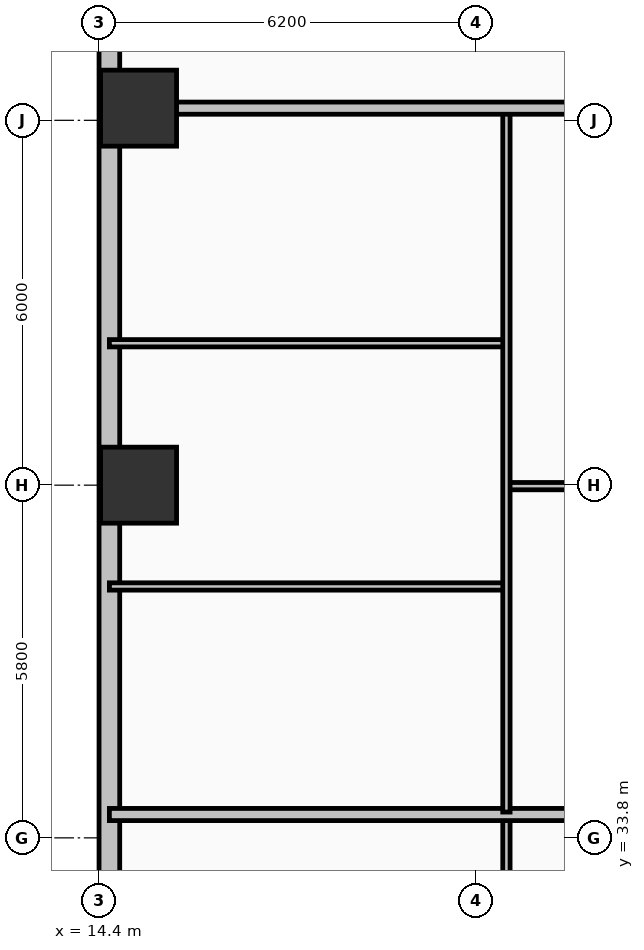
"""IFC4 building model, lengths in metres.
Left out: names, types, materials, properties, quantities, classifications, styles, units other than length and angle.
Written with IfcOpenShell. Run it as: python <this file> out.ifc"""

import sys

from ifc_helpers import new_model, si_unit, direction, frame, frame_2d, origin, origin_2d, place, context, subcontext, project, spatial, rectangle, extrude, element, fill, save


model = new_model("IFC4")
c1 = context("Model", 3, precision=1e-05, world=origin(), true_north=direction((0.0, 1.0)))
c2 = subcontext(c1, "Body", "Model", "MODEL_VIEW")
j1 = project(units=[si_unit("LENGTHUNIT", "METRE"), si_unit("PLANEANGLEUNIT", "RADIAN")], contexts=[c1])
p1 = place(None, origin())
s1 = spatial("IfcSite", under=j1, at=p1, CompositionType="ELEMENT")
p2 = place(p1, origin())
s2 = spatial("IfcBuilding", under=s1, at=p2, CompositionType="ELEMENT")
p3 = place(p2, frame((0.0, 0.0, 36.2)))
s3 = spatial("IfcBuildingStorey", under=s2, at=p3, CompositionType="ELEMENT", Elevation=36.2)
for number, where, z_axis, x_axis in (
    (1, (15.05, 39.6, 0.0), (0.0, 0.0, 1.0), (1.0, 0.0, 0.0)),
    (2, (15.05, 45.8, 0.0), (0.0, 0.0, 1.0), (1.0, 0.0, 0.0)),
):
    element("IfcColumn", number, at=place(p3, frame(where, z_axis=z_axis, x_axis=x_axis)), inside=s3, PredefinedType="COLUMN", context=c2, shape_type="SweptSolid", body=[
        extrude(rectangle(XDim=1.25, YDim=1.25, at=origin_2d()), origin(), (0.0, 0.0, 1.0), 3.7),
    ])
p4 = place(p3, frame((14.57, 47.4, 0.0), z_axis=(0.0, 0.0, 1.0), x_axis=(0.0, -1.0, 0.0)))
e3 = element("IfcWall", 3, at=p4, inside=s3, PredefinedType="SOLIDWALL", context=c2, shape_type="SweptSolid", body=[
    extrude(rectangle(XDim=14.8, YDim=0.34, at=frame_2d((7.4, 0.0))), origin(), (0.0, 0.0, 1.0), 2.7),
])
p5 = place(p4, frame((2.84, 0.0, 0.69)))
e4 = element("IfcOpeningElement", 4, at=p5, cuts=e3, PredefinedType="OPENING", context=c2, shape_type="SweptSolid", body=[
    extrude(rectangle(XDim=1.4, YDim=1.85, at=frame_2d((0.7, 0.925))), frame((0.0, 0.18, 0.0), z_axis=(0.0, -1.0, 0.0), x_axis=(1.0, 0.0, 0.0)), (0.0, 0.0, 1.0), 0.36),
])
p6 = place(p4, frame((5.72, 0.0, 0.69)))
e5 = element("IfcOpeningElement", 5, at=p6, cuts=e3, PredefinedType="OPENING", context=c2, shape_type="SweptSolid", body=[
    extrude(rectangle(XDim=1.4, YDim=1.85, at=frame_2d((0.7, 0.925))), frame((0.0, 0.18, 0.0), z_axis=(0.0, -1.0, 0.0), x_axis=(1.0, 0.0, 0.0)), (0.0, 0.0, 1.0), 0.36),
])
p7 = place(p4, frame((11.413, 0.0, 0.73)))
e6 = element("IfcOpeningElement", 6, at=p7, cuts=e3, PredefinedType="OPENING", context=c2, shape_type="SweptSolid", body=[
    extrude(rectangle(XDim=1.4, YDim=1.85, at=frame_2d((0.7, 0.925))), frame((0.0, 0.18, 0.0), z_axis=(0.0, -1.0, 0.0), x_axis=(1.0, 0.0, 0.0)), (0.0, 0.0, 1.0), 0.36),
])
p8 = place(p3, frame((21.1, 22.74, 0.0), z_axis=(0.0, 0.0, 1.0), x_axis=(0.0, 1.0, 0.0)))
e7 = element("IfcWall", 7, at=p8, inside=s3, PredefinedType="PARTITIONING", context=c2, shape_type="SweptSolid", body=[
    extrude(rectangle(XDim=11.404, YDim=0.12, at=frame_2d((5.702, 0.0))), origin(), (0.0, 0.0, 1.0), 2.53),
])
p9 = place(p8, frame((0.41, 0.0, 0.0)))
e8 = element("IfcOpeningElement", 8, at=p9, cuts=e7, PredefinedType="OPENING", context=c2, shape_type="SweptSolid", body=[
    extrude(rectangle(XDim=0.9, YDim=2.1, at=frame_2d((0.45, 1.05))), frame((0.0, 0.07, 0.0), z_axis=(0.0, -1.0, 0.0), x_axis=(1.0, 0.0, 0.0)), (0.0, 0.0, 1.0), 0.14),
])
p10 = place(p3, frame((14.57, 34.184, 0.0), z_axis=(0.0, 0.0, 1.0), x_axis=(1.0, 0.0, 0.0)))
e9 = element("IfcWall", 9, at=p10, inside=s3, PredefinedType="PARTITIONING", context=c2, shape_type="SweptSolid", body=[
    extrude(rectangle(XDim=8.78, YDim=0.2, at=frame_2d((4.39, 0.0))), origin(), (0.0, 0.0, 1.0), 2.53),
])
p11 = place(p3, frame((21.1, 39.584, 0.0), z_axis=(0.0, 0.0, 1.0), x_axis=(1.0, 0.0, 0.0)))
e10 = element("IfcWall", 10, at=p11, inside=s3, PredefinedType="PARTITIONING", context=c2, shape_type="SweptSolid", body=[
    extrude(rectangle(XDim=2.25, YDim=0.12, at=frame_2d((1.125, 0.0))), origin(), (0.0, 0.0, 1.0), 2.53),
])
p12 = place(p11, frame((0.6, 0.0, 0.0)))
e11 = element("IfcOpeningElement", 11, at=p12, cuts=e10, PredefinedType="OPENING", context=c2, shape_type="SweptSolid", body=[
    extrude(rectangle(XDim=0.85, YDim=2.1, at=frame_2d((0.425, 1.05))), frame((0.0, 0.07, 0.0), z_axis=(0.0, -1.0, 0.0), x_axis=(1.0, 0.0, 0.0)), (0.0, 0.0, 1.0), 0.14),
])
p13 = place(p3, frame((14.57, 37.934, 0.0), z_axis=(0.0, 0.0, 1.0), x_axis=(1.0, 0.0, 0.0)))
e12 = element("IfcWall", 12, at=p13, inside=s3, PredefinedType="PARTITIONING", context=c2, shape_type="SweptSolid", body=[
    extrude(rectangle(XDim=6.53, YDim=0.12, at=frame_2d((3.265, 0.0))), origin(), (0.0, 0.0, 1.0), 2.53),
])
p14 = place(p13, frame((5.18, 0.0, 0.0)))
e13 = element("IfcOpeningElement", 13, at=p14, cuts=e12, PredefinedType="OPENING", context=c2, shape_type="SweptSolid", body=[
    extrude(rectangle(XDim=0.9, YDim=2.1, at=frame_2d((0.45, 1.05))), frame((0.0, 0.07, 0.0), z_axis=(0.0, -1.0, 0.0), x_axis=(1.0, 0.0, 0.0)), (0.0, 0.0, 1.0), 0.14),
])
p15 = place(p3, frame((14.57, 41.934, 0.0), z_axis=(0.0, 0.0, 1.0), x_axis=(1.0, 0.0, 0.0)))
e14 = element("IfcWall", 14, at=p15, inside=s3, PredefinedType="PARTITIONING", context=c2, shape_type="SweptSolid", body=[
    extrude(rectangle(XDim=6.53, YDim=0.12, at=frame_2d((3.265, 0.0))), origin(), (0.0, 0.0, 1.0), 2.53),
])
p16 = place(p15, frame((5.18, 0.0, 0.0)))
e15 = element("IfcOpeningElement", 15, at=p16, cuts=e14, PredefinedType="OPENING", context=c2, shape_type="SweptSolid", body=[
    extrude(rectangle(XDim=0.9, YDim=2.1, at=frame_2d((0.45, 1.05))), frame((0.0, 0.07, 0.0), z_axis=(0.0, -1.0, 0.0), x_axis=(1.0, 0.0, 0.0)), (0.0, 0.0, 1.0), 0.14),
])
p17 = place(p3, frame((21.1, 34.224, 0.0), z_axis=(0.0, 0.0, 1.0), x_axis=(0.0, 1.0, 0.0)))
e16 = element("IfcWall", 16, at=p17, inside=s3, PredefinedType="PARTITIONING", context=c2, shape_type="SweptSolid", body=[
    extrude(rectangle(XDim=11.536, YDim=0.12, at=frame_2d((5.768, 0.0))), origin(), (0.0, 0.0, 1.0), 2.53),
])
p18 = place(p17, frame((0.41, 0.0, 0.0)))
e17 = element("IfcOpeningElement", 17, at=p18, cuts=e16, PredefinedType="OPENING", context=c2, shape_type="SweptSolid", body=[
    extrude(rectangle(XDim=0.9, YDim=2.1, at=frame_2d((0.45, 1.05))), frame((0.0, 0.07, 0.0), z_axis=(0.0, -1.0, 0.0), x_axis=(1.0, 0.0, 0.0)), (0.0, 0.0, 1.0), 0.14),
])
p19 = place(p3, frame((14.99, 45.8, 0.0), z_axis=(0.0, 0.0, 1.0), x_axis=(1.0, 0.0, 0.0)))
e18 = element("IfcWall", 18, at=p19, inside=s3, PredefinedType="PARTITIONING", context=c2, shape_type="SweptSolid", body=[
    extrude(rectangle(XDim=8.36, YDim=0.2, at=frame_2d((4.18, 0.0))), origin(), (0.0, 0.0, 1.0), 2.53),
])
p20 = place(p5, origin())
e19 = element("IfcWindow", 19, at=p20, inside=s3, PartitioningType="SINGLE_PANEL", PredefinedType="WINDOW", context=c2, shape_type="SweptSolid", body=[
    extrude(rectangle(XDim=1.4, YDim=1.85, at=frame_2d((0.7, 0.925))), frame((0.0, 0.03, 0.0), z_axis=(0.0, -1.0, 0.0), x_axis=(1.0, 0.0, 0.0)), (0.0, 0.0, 1.0), 0.06),
])
fill(e4, e19)
p21 = place(p6, origin())
e20 = element("IfcWindow", 20, at=p21, inside=s3, PartitioningType="SINGLE_PANEL", PredefinedType="WINDOW", context=c2, shape_type="SweptSolid", body=[
    extrude(rectangle(XDim=1.4, YDim=1.85, at=frame_2d((0.7, 0.925))), frame((0.0, 0.03, 0.0), z_axis=(0.0, -1.0, 0.0), x_axis=(1.0, 0.0, 0.0)), (0.0, 0.0, 1.0), 0.06),
])
fill(e5, e20)
p22 = place(p7, origin())
e21 = element("IfcWindow", 21, at=p22, inside=s3, PartitioningType="SINGLE_PANEL", PredefinedType="WINDOW", context=c2, shape_type="SweptSolid", body=[
    extrude(rectangle(XDim=1.4, YDim=1.85, at=frame_2d((0.7, 0.925))), frame((0.0, 0.03, 0.0), z_axis=(0.0, -1.0, 0.0), x_axis=(1.0, 0.0, 0.0)), (0.0, 0.0, 1.0), 0.06),
])
fill(e6, e21)
p23 = place(p12, origin())
e22 = element("IfcDoor", 22, at=p23, inside=s3, OperationType="SINGLE_SWING_LEFT", PredefinedType="DOOR", context=c2, shape_type="SweptSolid", body=[
    extrude(rectangle(XDim=0.85, YDim=2.1, at=frame_2d((0.425, 1.05))), frame((0.0, 0.025, 0.0), z_axis=(0.0, -1.0, 0.0), x_axis=(1.0, 0.0, 0.0)), (0.0, 0.0, 1.0), 0.05),
])
fill(e11, e22)
p24 = place(p14, origin())
e23 = element("IfcDoor", 23, at=p24, inside=s3, OperationType="SINGLE_SWING_LEFT", PredefinedType="DOOR", context=c2, shape_type="SweptSolid", body=[
    extrude(rectangle(XDim=0.9, YDim=2.1, at=frame_2d((0.45, 1.05))), frame((0.0, 0.025, 0.0), z_axis=(0.0, -1.0, 0.0), x_axis=(1.0, 0.0, 0.0)), (0.0, 0.0, 1.0), 0.05),
])
fill(e13, e23)
p25 = place(p16, origin())
e24 = element("IfcDoor", 24, at=p25, inside=s3, OperationType="SINGLE_SWING_RIGHT", PredefinedType="DOOR", context=c2, shape_type="SweptSolid", body=[
    extrude(rectangle(XDim=0.9, YDim=2.1, at=frame_2d((0.45, 1.05))), frame((0.0, 0.025, 0.0), z_axis=(0.0, -1.0, 0.0), x_axis=(1.0, 0.0, 0.0)), (0.0, 0.0, 1.0), 0.05),
])
fill(e15, e24)
p26 = place(p18, origin())
e25 = element("IfcDoor", 25, at=p26, inside=s3, OperationType="SINGLE_SWING_RIGHT", PredefinedType="DOOR", context=c2, shape_type="SweptSolid", body=[
    extrude(rectangle(XDim=0.9, YDim=2.1, at=frame_2d((0.45, 1.05))), frame((0.0, 0.025, 0.0), z_axis=(0.0, -1.0, 0.0), x_axis=(1.0, 0.0, 0.0)), (0.0, 0.0, 1.0), 0.05),
])
fill(e17, e25)
save(model, sys.argv[1])
